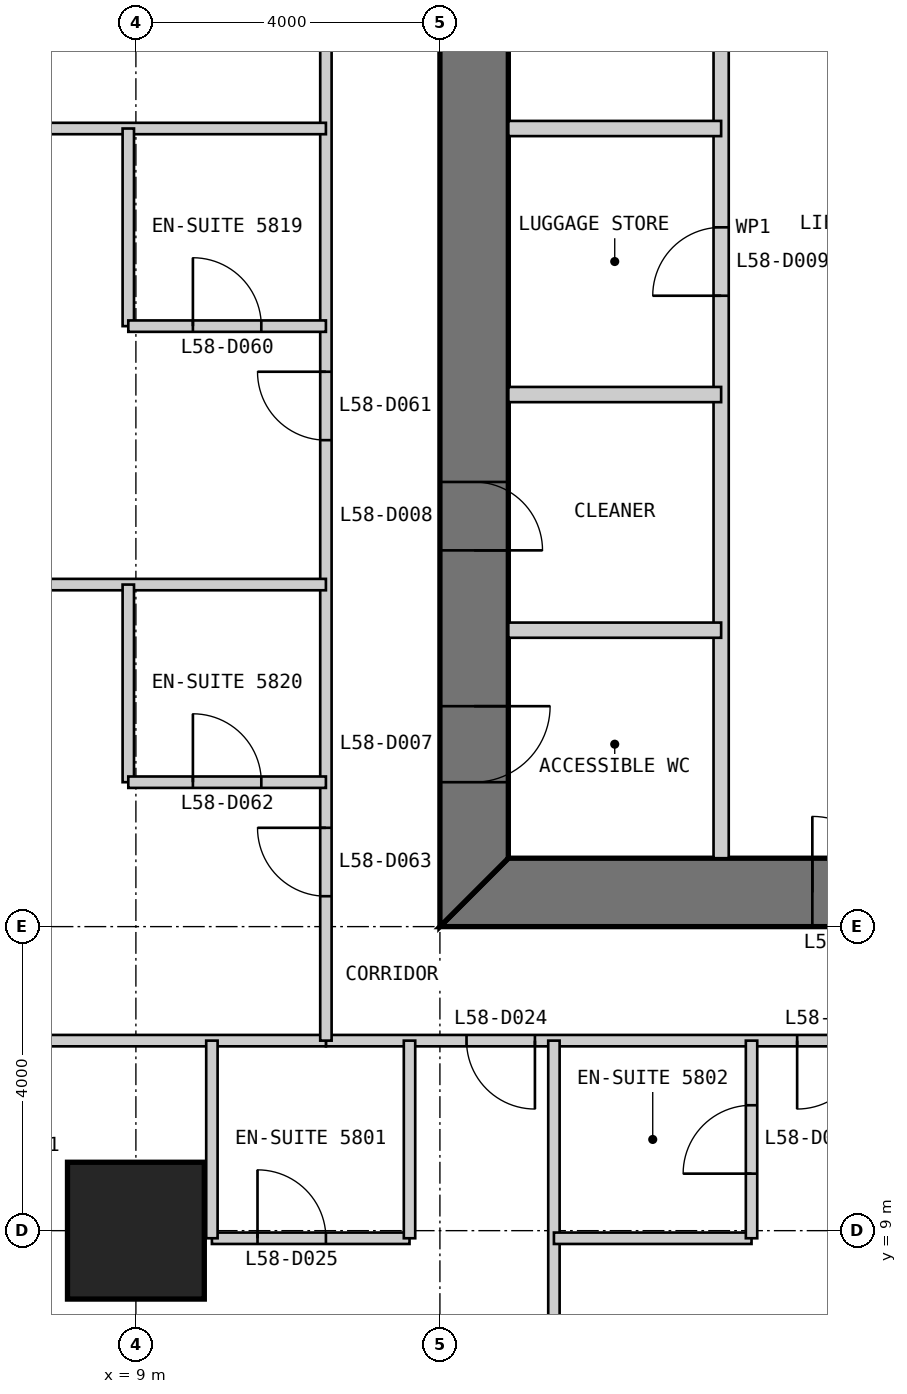
"""IFC4 building model, lengths in metres.
Left out: names, types, materials, properties, quantities, classifications, styles, units other than length and angle.
Written with IfcOpenShell. Run it as: python <this file> out.ifc"""

import sys

from ifc_helpers import new_model, si_unit, direction, frame, frame_2d, origin, origin_2d, place, context, subcontext, project, spatial, polyline, rectangle, outline, extrude, element, fill, save


model = new_model("IFC4")
c1 = context("Model", 3, precision=1e-05, world=origin(), true_north=direction((0.0, 1.0)))
c2 = subcontext(c1, "Body", "Model", "MODEL_VIEW")
j1 = project(units=[si_unit("LENGTHUNIT", "METRE"), si_unit("PLANEANGLEUNIT", "RADIAN")], contexts=[c1])
p1 = place(None, origin())
s1 = spatial("IfcSite", under=j1, at=p1, CompositionType="ELEMENT")
p2 = place(p1, origin())
s2 = spatial("IfcBuilding", under=s1, at=p2, CompositionType="ELEMENT")
p3 = place(p2, frame((0.0, 0.0, 249.2)))
s3 = spatial("IfcBuildingStorey", under=s2, at=p3, CompositionType="ELEMENT", Elevation=249.2)
p4 = place(p3, frame((9.0, 9.0, 0.0), z_axis=(0.0, 0.0, 1.0), x_axis=(1.0, 0.0, 0.0)))
e1 = element("IfcColumn", 1, at=p4, inside=s3, PredefinedType="COLUMN", context=c2, shape_type="SweptSolid", body=[
    extrude(rectangle(XDim=1.8, YDim=1.8, at=origin_2d()), origin(), (0.0, 0.0, 1.0), 3.4),
])
p5 = place(p3, frame((13.0, 13.45, 0.0), z_axis=(0.0, 0.0, 1.0), x_axis=(1.0, 0.0, 0.0)))
e2 = element("IfcWall", 2, at=p5, inside=s3, PredefinedType="SHEAR", context=c2, shape_type="SweptSolid", body=[
    extrude(outline(polyline([(0.0, -0.45), (24.0, -0.45), (23.1, 0.45), (0.9, 0.45), (0.0, -0.45)])), origin(), (0.0, 0.0, 1.0), 3.4),
])
p6 = place(p5, frame((4.9, 0.0, 0.0)))
e3 = element("IfcOpeningElement", 3, at=p6, cuts=e2, PredefinedType="OPENING", context=c2, shape_type="SweptSolid", body=[
    extrude(rectangle(XDim=1.0, YDim=2.2, at=frame_2d((0.5, 1.1))), frame((0.0, 0.46, 0.0), z_axis=(0.0, -1.0, 0.0), x_axis=(1.0, 0.0, 0.0)), (0.0, 0.0, 1.0), 0.92),
])
p7 = place(p5, frame((8.9, 0.0, 0.0)))
e4 = element("IfcOpeningElement", 4, at=p7, cuts=e2, PredefinedType="OPENING", context=c2, shape_type="SweptSolid", body=[
    extrude(rectangle(XDim=1.1, YDim=2.2, at=frame_2d((0.55, 1.1))), frame((0.0, 0.46, 0.0), z_axis=(0.0, -1.0, 0.0), x_axis=(1.0, 0.0, 0.0)), (0.0, 0.0, 1.0), 0.92),
])
p8 = place(p5, frame((15.05, 0.0, 0.0)))
e5 = element("IfcOpeningElement", 5, at=p8, cuts=e2, PredefinedType="OPENING", context=c2, shape_type="SweptSolid", body=[
    extrude(rectangle(XDim=0.9, YDim=2.2, at=frame_2d((0.45, 1.1))), frame((0.0, 0.46, 0.0), z_axis=(0.0, -1.0, 0.0), x_axis=(1.0, 0.0, 0.0)), (0.0, 0.0, 1.0), 0.92),
])
p9 = place(p5, frame((17.9, 0.0, 0.0)))
e6 = element("IfcOpeningElement", 6, at=p9, cuts=e2, PredefinedType="OPENING", context=c2, shape_type="SweptSolid", body=[
    extrude(rectangle(XDim=1.0, YDim=2.2, at=frame_2d((0.5, 1.1))), frame((0.0, 0.46, 0.0), z_axis=(0.0, -1.0, 0.0), x_axis=(1.0, 0.0, 0.0)), (0.0, 0.0, 1.0), 0.92),
])
p10 = place(p5, frame((21.4, 0.0, 0.0)))
e7 = element("IfcOpeningElement", 7, at=p10, cuts=e2, PredefinedType="OPENING", context=c2, shape_type="SweptSolid", body=[
    extrude(rectangle(XDim=1.0, YDim=2.2, at=frame_2d((0.5, 1.1))), frame((0.0, 0.46, 0.0), z_axis=(0.0, -1.0, 0.0), x_axis=(1.0, 0.0, 0.0)), (0.0, 0.0, 1.0), 0.92),
])
p11 = place(p3, frame((13.45, 36.1, 0.0), z_axis=(0.0, 0.0, 1.0), x_axis=(0.0, -1.0, 0.0)))
e8 = element("IfcWall", 8, at=p11, inside=s3, PredefinedType="SHEAR", context=c2, shape_type="SweptSolid", body=[
    extrude(outline(polyline([(-0.9, -0.45), (23.1, -0.45), (22.2, 0.45), (0.0, 0.45), (-0.9, -0.45)])), origin(), (0.0, 0.0, 1.0), 3.4),
])
p12 = place(p11, frame((20.2, 0.0, 0.0)))
e9 = element("IfcOpeningElement", 9, at=p12, cuts=e8, PredefinedType="OPENING", context=c2, shape_type="SweptSolid", body=[
    extrude(rectangle(XDim=1.0, YDim=2.2, at=frame_2d((0.5, 1.1))), frame((0.0, 0.46, 0.0), z_axis=(0.0, -1.0, 0.0), x_axis=(1.0, 0.0, 0.0)), (0.0, 0.0, 1.0), 0.92),
])
p13 = place(p11, frame((17.25, 0.0, 0.0)))
e10 = element("IfcOpeningElement", 10, at=p13, cuts=e8, PredefinedType="OPENING", context=c2, shape_type="SweptSolid", body=[
    extrude(rectangle(XDim=0.9, YDim=2.2, at=frame_2d((0.45, 1.1))), frame((0.0, 0.46, 0.0), z_axis=(0.0, -1.0, 0.0), x_axis=(1.0, 0.0, 0.0)), (0.0, 0.0, 1.0), 0.92),
])
p14 = place(p3, frame((16.7, 13.9, 0.0), z_axis=(0.0, 0.0, 1.0), x_axis=(0.0, 1.0, 0.0)))
e11 = element("IfcWall", 11, at=p14, inside=s3, PredefinedType="PARTITIONING", context=c2, shape_type="SweptSolid", body=[
    extrude(rectangle(XDim=16.1, YDim=0.2, at=frame_2d((8.05, 0.0))), origin(), (0.0, 0.0, 1.0), 3.2),
])
p15 = place(p14, frame((7.4, 0.0, 0.0)))
e12 = element("IfcOpeningElement", 12, at=p15, cuts=e11, PredefinedType="OPENING", context=c2, shape_type="SweptSolid", body=[
    extrude(rectangle(XDim=0.9, YDim=2.2, at=frame_2d((0.45, 1.1))), frame((0.0, 0.11, 0.0), z_axis=(0.0, -1.0, 0.0), x_axis=(1.0, 0.0, 0.0)), (0.0, 0.0, 1.0), 0.22),
])
p16 = place(p14, frame((12.4, 0.0, 0.0)))
e13 = element("IfcOpeningElement", 13, at=p16, cuts=e11, PredefinedType="OPENING", context=c2, shape_type="SweptSolid", body=[
    extrude(rectangle(XDim=0.9, YDim=2.2, at=frame_2d((0.45, 1.1))), frame((0.0, 0.11, 0.0), z_axis=(0.0, -1.0, 0.0), x_axis=(1.0, 0.0, 0.0)), (0.0, 0.0, 1.0), 0.22),
])
for number, where, z_axis, x_axis in (
    (14, (13.9, 16.9, 0.0), (0.0, 0.0, 1.0), (1.0, 0.0, 0.0)),
    (15, (13.9, 20.0, 0.0), (0.0, 0.0, 1.0), (1.0, 0.0, 0.0)),
    (16, (13.9, 23.5, 0.0), (0.0, 0.0, 1.0), (1.0, 0.0, 0.0)),
):
    element("IfcWall", number, at=place(p3, frame(where, z_axis=z_axis, x_axis=x_axis)), inside=s3, PredefinedType="PARTITIONING", context=c2, shape_type="SweptSolid", body=[
        extrude(rectangle(XDim=2.8, YDim=0.2, at=frame_2d((1.4, 0.0))), origin(), (0.0, 0.0, 1.0), 3.2),
    ])
p17 = place(p3, frame((11.5, 11.5, 0.0), z_axis=(0.0, 0.0, 1.0), x_axis=(1.0, 0.0, 0.0)))
e17 = element("IfcWall", 17, at=p17, inside=s3, PredefinedType="PARTITIONING", context=c2, shape_type="SweptSolid", body=[
    extrude(rectangle(XDim=27.0, YDim=0.15, at=frame_2d((13.5, 0.0))), origin(), (0.0, 0.0, 1.0), 3.25),
])
p18 = place(p17, frame((1.85, 0.0, 0.0)))
e18 = element("IfcOpeningElement", 18, at=p18, cuts=e17, PredefinedType="OPENING", context=c2, shape_type="SweptSolid", body=[
    extrude(rectangle(XDim=0.9, YDim=2.1, at=frame_2d((0.45, 1.05))), frame((0.0, 0.085, 0.0), z_axis=(0.0, -1.0, 0.0), x_axis=(1.0, 0.0, 0.0)), (0.0, 0.0, 1.0), 0.17),
])
p19 = place(p17, frame((6.2, 0.0, 0.0)))
e19 = element("IfcOpeningElement", 19, at=p19, cuts=e17, PredefinedType="OPENING", context=c2, shape_type="SweptSolid", body=[
    extrude(rectangle(XDim=0.9, YDim=2.1, at=frame_2d((0.45, 1.05))), frame((0.0, 0.085, 0.0), z_axis=(0.0, -1.0, 0.0), x_axis=(1.0, 0.0, 0.0)), (0.0, 0.0, 1.0), 0.17),
])
p20 = place(p17, frame((12.2, 0.0, 0.0)))
e20 = element("IfcOpeningElement", 20, at=p20, cuts=e17, PredefinedType="OPENING", context=c2, shape_type="SweptSolid", body=[
    extrude(rectangle(XDim=0.9, YDim=2.1, at=frame_2d((0.45, 1.05))), frame((0.0, 0.085, 0.0), z_axis=(0.0, -1.0, 0.0), x_axis=(1.0, 0.0, 0.0)), (0.0, 0.0, 1.0), 0.17),
])
p21 = place(p17, frame((18.8, 0.0, 0.0)))
e21 = element("IfcOpeningElement", 21, at=p21, cuts=e17, PredefinedType="OPENING", context=c2, shape_type="SweptSolid", body=[
    extrude(rectangle(XDim=1.0, YDim=2.1, at=frame_2d((0.5, 1.05))), frame((0.0, 0.085, 0.0), z_axis=(0.0, -1.0, 0.0), x_axis=(1.0, 0.0, 0.0)), (0.0, 0.0, 1.0), 0.17),
])
p22 = place(p17, frame((24.2, 0.0, 0.0)))
e22 = element("IfcOpeningElement", 22, at=p22, cuts=e17, PredefinedType="OPENING", context=c2, shape_type="SweptSolid", body=[
    extrude(rectangle(XDim=0.9, YDim=2.1, at=frame_2d((0.45, 1.05))), frame((0.0, 0.085, 0.0), z_axis=(0.0, -1.0, 0.0), x_axis=(1.0, 0.0, 0.0)), (0.0, 0.0, 1.0), 0.17),
])
p23 = place(p3, frame((0.15, 11.5, 0.0), z_axis=(0.0, 0.0, 1.0), x_axis=(1.0, 0.0, 0.0)))
e23 = element("IfcWall", 23, at=p23, inside=s3, PredefinedType="PARTITIONING", context=c2, shape_type="SweptSolid", body=[
    extrude(rectangle(XDim=11.35, YDim=0.15, at=frame_2d((5.675, 0.0))), origin(), (0.0, 0.0, 1.0), 3.25),
])
p24 = place(p3, frame((10.0, 8.9, 0.0), z_axis=(0.0, 0.0, 1.0), x_axis=(1.0, 0.0, 0.0)))
e24 = element("IfcWall", 24, at=p24, inside=s3, PredefinedType="PARTITIONING", context=c2, shape_type="SweptSolid", body=[
    extrude(rectangle(XDim=2.6, YDim=0.15, at=frame_2d((1.3, 0.0))), origin(), (0.0, 0.0, 1.0), 2.638),
])
p25 = place(p24, frame((0.6, 0.0, 0.0)))
e25 = element("IfcOpeningElement", 25, at=p25, cuts=e24, PredefinedType="OPENING", context=c2, shape_type="SweptSolid", body=[
    extrude(rectangle(XDim=0.9, YDim=2.1, at=frame_2d((0.45, 1.05))), frame((0.0, 0.085, 0.0), z_axis=(0.0, -1.0, 0.0), x_axis=(1.0, 0.0, 0.0)), (0.0, 0.0, 1.0), 0.17),
])
for number, where, z_axis, x_axis in (
    (26, (10.0, 8.9, 0.0), (0.0, 0.0, 1.0), (0.0, 1.0, 0.0)),
    (27, (12.6, 8.9, 0.0), (0.0, 0.0, 1.0), (0.0, 1.0, 0.0)),
):
    element("IfcWall", number, at=place(p3, frame(where, z_axis=z_axis, x_axis=x_axis)), inside=s3, PredefinedType="PARTITIONING", context=c2, shape_type="SweptSolid", body=[
        extrude(rectangle(XDim=2.6, YDim=0.15, at=frame_2d((1.3, 0.0))), origin(), (0.0, 0.0, 1.0), 3.25),
    ])
p26 = place(p3, frame((14.5, 0.15, 0.0), z_axis=(0.0, 0.0, 1.0), x_axis=(0.0, 1.0, 0.0)))
e28 = element("IfcWall", 28, at=p26, inside=s3, PredefinedType="PARTITIONING", context=c2, shape_type="SweptSolid", body=[
    extrude(rectangle(XDim=11.35, YDim=0.15, at=frame_2d((5.675, 0.0))), origin(), (0.0, 0.0, 1.0), 3.25),
])
p27 = place(p3, frame((14.5, 8.9, 0.0), z_axis=(0.0, 0.0, 1.0), x_axis=(1.0, 0.0, 0.0)))
e29 = element("IfcWall", 29, at=p27, inside=s3, PredefinedType="PARTITIONING", context=c2, shape_type="SweptSolid", body=[
    extrude(rectangle(XDim=2.6, YDim=0.15, at=frame_2d((1.3, 0.0))), origin(), (0.0, 0.0, 1.0), 3.25),
])
p28 = place(p3, frame((17.1, 8.9, 0.0), z_axis=(0.0, 0.0, 1.0), x_axis=(0.0, 1.0, 0.0)))
e30 = element("IfcWall", 30, at=p28, inside=s3, PredefinedType="PARTITIONING", context=c2, shape_type="SweptSolid", body=[
    extrude(rectangle(XDim=2.6, YDim=0.15, at=frame_2d((1.3, 0.0))), origin(), (0.0, 0.0, 1.0), 3.25),
])
p29 = place(p28, frame((0.85, 0.0, 0.0)))
e31 = element("IfcOpeningElement", 31, at=p29, cuts=e30, PredefinedType="OPENING", context=c2, shape_type="SweptSolid", body=[
    extrude(rectangle(XDim=0.9, YDim=2.1, at=frame_2d((0.45, 1.05))), frame((0.0, 0.085, 0.0), z_axis=(0.0, -1.0, 0.0), x_axis=(1.0, 0.0, 0.0)), (0.0, 0.0, 1.0), 0.17),
])
p30 = place(p3, frame((11.5, 38.5, 0.0), z_axis=(0.0, 0.0, 1.0), x_axis=(0.0, -1.0, 0.0)))
e32 = element("IfcWall", 32, at=p30, inside=s3, PredefinedType="PARTITIONING", context=c2, shape_type="SweptSolid", body=[
    extrude(rectangle(XDim=27.0, YDim=0.15, at=frame_2d((13.5, 0.0))), origin(), (0.0, 0.0, 1.0), 3.25),
])
p31 = place(p30, frame((1.85, 0.0, 0.0)))
e33 = element("IfcOpeningElement", 33, at=p31, cuts=e32, PredefinedType="OPENING", context=c2, shape_type="SweptSolid", body=[
    extrude(rectangle(XDim=0.9, YDim=2.1, at=frame_2d((0.45, 1.05))), frame((0.0, 0.085, 0.0), z_axis=(0.0, -1.0, 0.0), x_axis=(1.0, 0.0, 0.0)), (0.0, 0.0, 1.0), 0.17),
])
p32 = place(p30, frame((6.2, 0.0, 0.0)))
e34 = element("IfcOpeningElement", 34, at=p32, cuts=e32, PredefinedType="OPENING", context=c2, shape_type="SweptSolid", body=[
    extrude(rectangle(XDim=0.9, YDim=2.1, at=frame_2d((0.45, 1.05))), frame((0.0, 0.085, 0.0), z_axis=(0.0, -1.0, 0.0), x_axis=(1.0, 0.0, 0.0)), (0.0, 0.0, 1.0), 0.17),
])
p33 = place(p30, frame((12.2, 0.0, 0.0)))
e35 = element("IfcOpeningElement", 35, at=p33, cuts=e32, PredefinedType="OPENING", context=c2, shape_type="SweptSolid", body=[
    extrude(rectangle(XDim=0.9, YDim=2.1, at=frame_2d((0.45, 1.05))), frame((0.0, 0.085, 0.0), z_axis=(0.0, -1.0, 0.0), x_axis=(1.0, 0.0, 0.0)), (0.0, 0.0, 1.0), 0.17),
])
p34 = place(p30, frame((18.2, 0.0, 0.0)))
e36 = element("IfcOpeningElement", 36, at=p34, cuts=e32, PredefinedType="OPENING", context=c2, shape_type="SweptSolid", body=[
    extrude(rectangle(XDim=0.9, YDim=2.1, at=frame_2d((0.45, 1.05))), frame((0.0, 0.085, 0.0), z_axis=(0.0, -1.0, 0.0), x_axis=(1.0, 0.0, 0.0)), (0.0, 0.0, 1.0), 0.17),
])
p35 = place(p30, frame((24.2, 0.0, 0.0)))
e37 = element("IfcOpeningElement", 37, at=p35, cuts=e32, PredefinedType="OPENING", context=c2, shape_type="SweptSolid", body=[
    extrude(rectangle(XDim=0.9, YDim=2.1, at=frame_2d((0.45, 1.05))), frame((0.0, 0.085, 0.0), z_axis=(0.0, -1.0, 0.0), x_axis=(1.0, 0.0, 0.0)), (0.0, 0.0, 1.0), 0.17),
])
p36 = place(p3, frame((0.15, 23.5, 0.0), z_axis=(0.0, 0.0, 1.0), x_axis=(1.0, 0.0, 0.0)))
e38 = element("IfcWall", 38, at=p36, inside=s3, PredefinedType="PARTITIONING", context=c2, shape_type="SweptSolid", body=[
    extrude(rectangle(XDim=11.35, YDim=0.15, at=frame_2d((5.675, 0.0))), origin(), (0.0, 0.0, 1.0), 3.25),
])
p37 = place(p3, frame((8.9, 23.5, 0.0), z_axis=(0.0, 0.0, 1.0), x_axis=(0.0, -1.0, 0.0)))
e39 = element("IfcWall", 39, at=p37, inside=s3, PredefinedType="PARTITIONING", context=c2, shape_type="SweptSolid", body=[
    extrude(rectangle(XDim=2.6, YDim=0.15, at=frame_2d((1.3, 0.0))), origin(), (0.0, 0.0, 1.0), 3.25),
])
p38 = place(p3, frame((8.9, 20.9, 0.0), z_axis=(0.0, 0.0, 1.0), x_axis=(1.0, 0.0, 0.0)))
e40 = element("IfcWall", 40, at=p38, inside=s3, PredefinedType="PARTITIONING", context=c2, shape_type="SweptSolid", body=[
    extrude(rectangle(XDim=2.6, YDim=0.15, at=frame_2d((1.3, 0.0))), origin(), (0.0, 0.0, 1.0), 3.25),
])
p39 = place(p38, frame((0.85, 0.0, 0.0)))
e41 = element("IfcOpeningElement", 41, at=p39, cuts=e40, PredefinedType="OPENING", context=c2, shape_type="SweptSolid", body=[
    extrude(rectangle(XDim=0.9, YDim=2.1, at=frame_2d((0.45, 1.05))), frame((0.0, 0.085, 0.0), z_axis=(0.0, -1.0, 0.0), x_axis=(1.0, 0.0, 0.0)), (0.0, 0.0, 1.0), 0.17),
])
p40 = place(p3, frame((0.15, 17.5, 0.0), z_axis=(0.0, 0.0, 1.0), x_axis=(1.0, 0.0, 0.0)))
e42 = element("IfcWall", 42, at=p40, inside=s3, PredefinedType="PARTITIONING", context=c2, shape_type="SweptSolid", body=[
    extrude(rectangle(XDim=11.35, YDim=0.15, at=frame_2d((5.675, 0.0))), origin(), (0.0, 0.0, 1.0), 3.25),
])
p41 = place(p3, frame((8.9, 17.5, 0.0), z_axis=(0.0, 0.0, 1.0), x_axis=(0.0, -1.0, 0.0)))
e43 = element("IfcWall", 43, at=p41, inside=s3, PredefinedType="PARTITIONING", context=c2, shape_type="SweptSolid", body=[
    extrude(rectangle(XDim=2.6, YDim=0.15, at=frame_2d((1.3, 0.0))), origin(), (0.0, 0.0, 1.0), 3.25),
])
p42 = place(p3, frame((8.9, 14.9, 0.0), z_axis=(0.0, 0.0, 1.0), x_axis=(1.0, 0.0, 0.0)))
e44 = element("IfcWall", 44, at=p42, inside=s3, PredefinedType="PARTITIONING", context=c2, shape_type="SweptSolid", body=[
    extrude(rectangle(XDim=2.6, YDim=0.15, at=frame_2d((1.3, 0.0))), origin(), (0.0, 0.0, 1.0), 3.25),
])
p43 = place(p42, frame((0.85, 0.0, 0.0)))
e45 = element("IfcOpeningElement", 45, at=p43, cuts=e44, PredefinedType="OPENING", context=c2, shape_type="SweptSolid", body=[
    extrude(rectangle(XDim=0.9, YDim=2.1, at=frame_2d((0.45, 1.05))), frame((0.0, 0.085, 0.0), z_axis=(0.0, -1.0, 0.0), x_axis=(1.0, 0.0, 0.0)), (0.0, 0.0, 1.0), 0.17),
])
p44 = place(p6, origin())
e46 = element("IfcDoor", 46, at=p44, inside=s3, OperationType="SINGLE_SWING_LEFT", PredefinedType="DOOR", context=c2, shape_type="SweptSolid", body=[
    extrude(rectangle(XDim=1.0, YDim=2.2, at=frame_2d((0.5, 1.1))), frame((0.0, 0.025, 0.0), z_axis=(0.0, -1.0, 0.0), x_axis=(1.0, 0.0, 0.0)), (0.0, 0.0, 1.0), 0.05),
    extrude(outline(polyline([(0.0, 0.0), (0.04, 0.0), (0.04, 2.16), (0.96, 2.16), (0.96, 0.0), (1.0, 0.0), (1.0, 2.2), (0.0, 2.2), (0.0, 0.0)])), frame((0.0, 0.3, 0.0), z_axis=(0.0, -1.0, 0.0), x_axis=(1.0, 0.0, 0.0)), (0.0, 0.0, 1.0), 0.6),
])
fill(e3, e46)
p45 = place(p12, origin())
e47 = element("IfcDoor", 47, at=p45, inside=s3, OperationType="SINGLE_SWING_LEFT", PredefinedType="DOOR", context=c2, shape_type="SweptSolid", body=[
    extrude(rectangle(XDim=1.0, YDim=2.2, at=frame_2d((0.5, 1.1))), frame((0.0, 0.025, 0.0), z_axis=(0.0, -1.0, 0.0), x_axis=(1.0, 0.0, 0.0)), (0.0, 0.0, 1.0), 0.05),
    extrude(outline(polyline([(0.0, 0.0), (0.04, 0.0), (0.04, 2.16), (0.96, 2.16), (0.96, 0.0), (1.0, 0.0), (1.0, 2.2), (0.0, 2.2), (0.0, 0.0)])), frame((0.0, 0.3, 0.0), z_axis=(0.0, -1.0, 0.0), x_axis=(1.0, 0.0, 0.0)), (0.0, 0.0, 1.0), 0.6),
])
fill(e9, e47)
p46 = place(p13, origin())
e48 = element("IfcDoor", 48, at=p46, inside=s3, OperationType="SINGLE_SWING_RIGHT", PredefinedType="DOOR", context=c2, shape_type="SweptSolid", body=[
    extrude(rectangle(XDim=0.9, YDim=2.2, at=frame_2d((0.45, 1.1))), frame((0.0, 0.025, 0.0), z_axis=(0.0, -1.0, 0.0), x_axis=(1.0, 0.0, 0.0)), (0.0, 0.0, 1.0), 0.05),
    extrude(outline(polyline([(0.0, 0.0), (0.04, 0.0), (0.04, 2.16), (0.86, 2.16), (0.86, 0.0), (0.9, 0.0), (0.9, 2.2), (0.0, 2.2), (0.0, 0.0)])), frame((0.0, 0.3, 0.0), z_axis=(0.0, -1.0, 0.0), x_axis=(1.0, 0.0, 0.0)), (0.0, 0.0, 1.0), 0.6),
])
fill(e10, e48)
p47 = place(p15, origin())
e49 = element("IfcDoor", 49, at=p47, inside=s3, OperationType="SINGLE_SWING_LEFT", PredefinedType="DOOR", context=c2, shape_type="SweptSolid", body=[
    extrude(rectangle(XDim=0.9, YDim=2.2, at=frame_2d((0.45, 1.1))), frame((0.0, 0.025, 0.0), z_axis=(0.0, -1.0, 0.0), x_axis=(1.0, 0.0, 0.0)), (0.0, 0.0, 1.0), 0.05),
])
fill(e12, e49)
p48 = place(p18, frame((0.9, 0.0, 0.0), z_axis=(0.0, 0.0, 1.0), x_axis=(-1.0, 0.0, 0.0)))
e50 = element("IfcDoor", 50, at=p48, inside=s3, OperationType="SINGLE_SWING_LEFT", PredefinedType="DOOR", context=c2, shape_type="SweptSolid", body=[
    extrude(rectangle(XDim=0.9, YDim=2.1, at=frame_2d((0.45, 1.05))), frame((0.0, 0.025, 0.0), z_axis=(0.0, -1.0, 0.0), x_axis=(1.0, 0.0, 0.0)), (0.0, 0.0, 1.0), 0.05),
])
fill(e18, e50)
p49 = place(p25, origin())
e51 = element("IfcDoor", 51, at=p49, inside=s3, OperationType="SINGLE_SWING_LEFT", PredefinedType="DOOR", context=c2, shape_type="SweptSolid", body=[
    extrude(rectangle(XDim=0.9, YDim=2.1, at=frame_2d((0.45, 1.05))), frame((0.0, 0.025, 0.0), z_axis=(0.0, -1.0, 0.0), x_axis=(1.0, 0.0, 0.0)), (0.0, 0.0, 1.0), 0.05),
])
fill(e25, e51)
p50 = place(p29, origin())
e52 = element("IfcDoor", 52, at=p50, inside=s3, OperationType="SINGLE_SWING_LEFT", PredefinedType="DOOR", context=c2, shape_type="SweptSolid", body=[
    extrude(rectangle(XDim=0.9, YDim=2.1, at=frame_2d((0.45, 1.05))), frame((0.0, 0.025, 0.0), z_axis=(0.0, -1.0, 0.0), x_axis=(1.0, 0.0, 0.0)), (0.0, 0.0, 1.0), 0.05),
])
fill(e31, e52)
p51 = place(p19, frame((0.9, 0.0, 0.0), z_axis=(0.0, 0.0, 1.0), x_axis=(-1.0, 0.0, 0.0)))
e53 = element("IfcDoor", 53, at=p51, inside=s3, OperationType="SINGLE_SWING_RIGHT", PredefinedType="DOOR", context=c2, shape_type="SweptSolid", body=[
    extrude(rectangle(XDim=0.9, YDim=2.1, at=frame_2d((0.45, 1.05))), frame((0.0, 0.025, 0.0), z_axis=(0.0, -1.0, 0.0), x_axis=(1.0, 0.0, 0.0)), (0.0, 0.0, 1.0), 0.05),
])
fill(e19, e53)
p52 = place(p39, origin())
e54 = element("IfcDoor", 54, at=p52, inside=s3, OperationType="SINGLE_SWING_LEFT", PredefinedType="DOOR", context=c2, shape_type="SweptSolid", body=[
    extrude(rectangle(XDim=0.9, YDim=2.1, at=frame_2d((0.45, 1.05))), frame((0.0, 0.025, 0.0), z_axis=(0.0, -1.0, 0.0), x_axis=(1.0, 0.0, 0.0)), (0.0, 0.0, 1.0), 0.05),
])
fill(e41, e54)
p53 = place(p34, frame((0.9, 0.0, 0.0), z_axis=(0.0, 0.0, 1.0), x_axis=(-1.0, 0.0, 0.0)))
e55 = element("IfcDoor", 55, at=p53, inside=s3, OperationType="SINGLE_SWING_RIGHT", PredefinedType="DOOR", context=c2, shape_type="SweptSolid", body=[
    extrude(rectangle(XDim=0.9, YDim=2.1, at=frame_2d((0.45, 1.05))), frame((0.0, 0.025, 0.0), z_axis=(0.0, -1.0, 0.0), x_axis=(1.0, 0.0, 0.0)), (0.0, 0.0, 1.0), 0.05),
])
fill(e36, e55)
p54 = place(p43, origin())
e56 = element("IfcDoor", 56, at=p54, inside=s3, OperationType="SINGLE_SWING_LEFT", PredefinedType="DOOR", context=c2, shape_type="SweptSolid", body=[
    extrude(rectangle(XDim=0.9, YDim=2.1, at=frame_2d((0.45, 1.05))), frame((0.0, 0.025, 0.0), z_axis=(0.0, -1.0, 0.0), x_axis=(1.0, 0.0, 0.0)), (0.0, 0.0, 1.0), 0.05),
])
fill(e45, e56)
p55 = place(p35, frame((0.9, 0.0, 0.0), z_axis=(0.0, 0.0, 1.0), x_axis=(-1.0, 0.0, 0.0)))
e57 = element("IfcDoor", 57, at=p55, inside=s3, OperationType="SINGLE_SWING_RIGHT", PredefinedType="DOOR", context=c2, shape_type="SweptSolid", body=[
    extrude(rectangle(XDim=0.9, YDim=2.1, at=frame_2d((0.45, 1.05))), frame((0.0, 0.025, 0.0), z_axis=(0.0, -1.0, 0.0), x_axis=(1.0, 0.0, 0.0)), (0.0, 0.0, 1.0), 0.05),
])
fill(e37, e57)
save(model, sys.argv[1])
